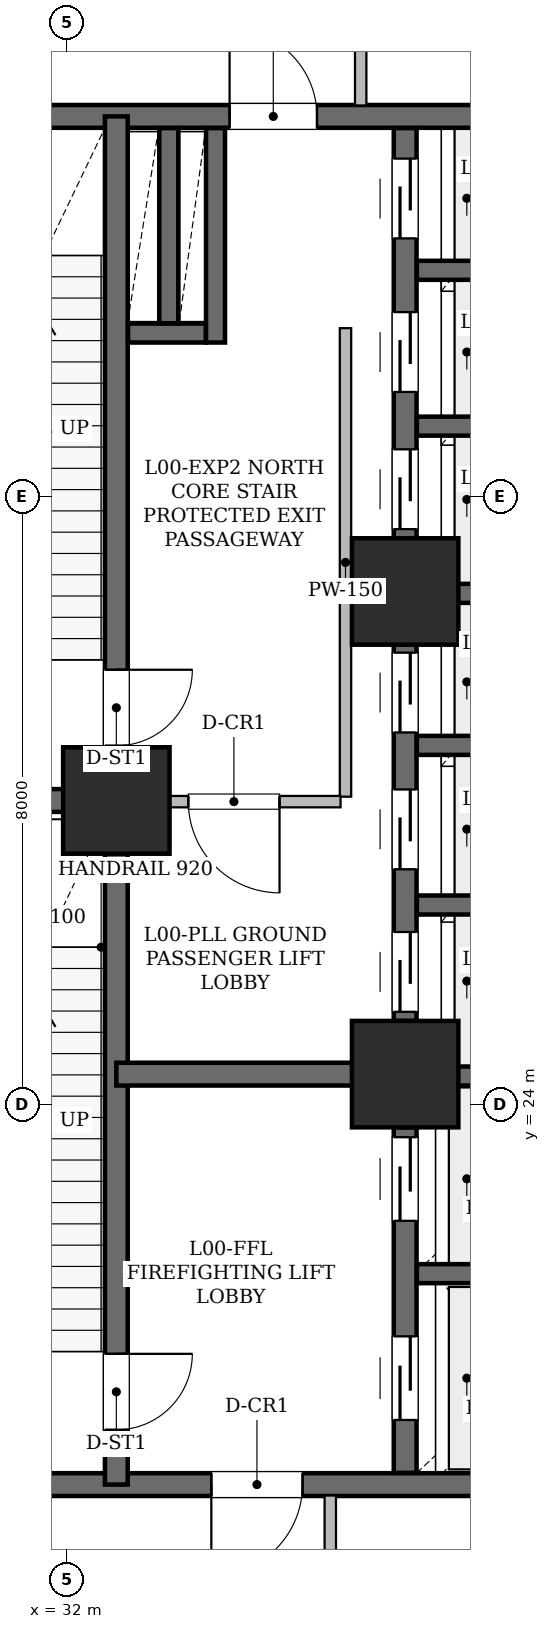
"""IFC4 building model, lengths in metres.
Left out: names, types, materials, properties, quantities, classifications, styles, units other than length and angle.
Written with IfcOpenShell. Run it as: python <this file> out.ifc"""

import sys

from ifc_helpers import new_model, si_unit, direction, frame, frame_2d, origin, origin_2d, place, context, subcontext, project, spatial, rectangle, hollow_rectangle, extrude, element, fill, save


model = new_model("IFC4")
c1 = context("Model", 3, precision=1e-05, world=origin(), true_north=direction((0.0, 1.0)))
c2 = subcontext(c1, "Body", "Model", "MODEL_VIEW")
j1 = project(units=[si_unit("LENGTHUNIT", "METRE"), si_unit("PLANEANGLEUNIT", "RADIAN")], contexts=[c1])
p1 = place(None, origin())
s1 = spatial("IfcSite", under=j1, at=p1, CompositionType="ELEMENT")
p2 = place(p1, origin())
s2 = spatial("IfcBuilding", under=s1, at=p2, CompositionType="ELEMENT")
p3 = place(p2, origin())
s3 = spatial("IfcBuildingStorey", under=s2, at=p3, CompositionType="ELEMENT", Elevation=0.0)
for number, where, z_axis, x_axis in (
    (1, (32.65, 28.0, 0.0), (0.0, 0.0, 1.0), (1.0, 0.0, 0.0)),
    (2, (36.45, 24.4, 0.0), (0.0, 0.0, 1.0), (1.0, 0.0, 0.0)),
    (3, (36.45, 30.75, 0.0), (0.0, 0.0, 1.0), (1.0, 0.0, 0.0)),
):
    element("IfcColumn", number, at=place(p3, frame(where, z_axis=z_axis, x_axis=x_axis)), inside=s3, PredefinedType="COLUMN", context=c2, shape_type="SweptSolid", body=[
        extrude(hollow_rectangle(XDim=1.4, YDim=1.4, WallThickness=0.07, at=origin_2d()), origin(), (0.0, 0.0, 1.0), 7.2),
    ])
p4 = place(p3, frame((39.4, 19.0, 0.0), z_axis=(0.0, 0.0, 1.0), x_axis=(-1.0, 0.0, 0.0)))
e4 = element("IfcWall", 4, at=p4, inside=s3, PredefinedType="SHEAR", context=c2, shape_type="SweptSolid", body=[
    extrude(rectangle(XDim=10.4, YDim=0.3, at=frame_2d((5.2, 0.0))), origin(), (0.0, 0.0, 1.0), 6.78),
])
p5 = place(p4, frame((4.3, 0.0, 0.0)))
e5 = element("IfcOpeningElement", 5, at=p5, cuts=e4, PredefinedType="OPENING", context=c2, shape_type="SweptSolid", body=[
    extrude(rectangle(XDim=1.2, YDim=2.15, at=frame_2d((0.6, 1.075))), frame((0.0, 0.16, 0.0), z_axis=(0.0, -1.0, 0.0), x_axis=(1.0, 0.0, 0.0)), (0.0, 0.0, 1.0), 0.32),
])
p6 = place(p3, frame((29.0, 37.0, 0.0), z_axis=(0.0, 0.0, 1.0), x_axis=(1.0, 0.0, 0.0)))
e6 = element("IfcWall", 6, at=p6, inside=s3, PredefinedType="SHEAR", context=c2, shape_type="SweptSolid", body=[
    extrude(rectangle(XDim=10.4, YDim=0.3, at=frame_2d((5.2, 0.0))), origin(), (0.0, 0.0, 1.0), 6.78),
])
p7 = place(p6, frame((5.14, 0.0, 0.0)))
e7 = element("IfcOpeningElement", 7, at=p7, cuts=e6, PredefinedType="OPENING", context=c2, shape_type="SweptSolid", body=[
    extrude(rectangle(XDim=1.15, YDim=2.2, at=frame_2d((0.575, 1.1))), frame((0.0, 0.16, 0.0), z_axis=(0.0, -1.0, 0.0), x_axis=(1.0, 0.0, 0.0)), (0.0, 0.0, 1.0), 0.32),
])
p8 = place(p3, frame((32.65, 28.0, 0.0), z_axis=(0.0, 0.0, 1.0), x_axis=(0.0, -1.0, 0.0)))
e8 = element("IfcWall", 8, at=p8, inside=s3, PredefinedType="SHEAR", context=c2, shape_type="SweptSolid", body=[
    extrude(rectangle(XDim=9.0, YDim=0.3, at=frame_2d((4.5, 0.0))), origin(), (0.0, 0.0, 1.0), 6.78),
])
p9 = place(p8, frame((7.28, 0.0, 0.0)))
e9 = element("IfcOpeningElement", 9, at=p9, cuts=e8, PredefinedType="OPENING", context=c2, shape_type="SweptSolid", body=[
    extrude(rectangle(XDim=1.0, YDim=2.15, at=frame_2d((0.5, 1.075))), frame((0.0, 0.16, 0.0), z_axis=(0.0, -1.0, 0.0), x_axis=(1.0, 0.0, 0.0)), (0.0, 0.0, 1.0), 0.32),
])
p10 = place(p3, frame((32.65, 37.0, 0.0), z_axis=(0.0, 0.0, 1.0), x_axis=(0.0, -1.0, 0.0)))
e10 = element("IfcWall", 10, at=p10, inside=s3, PredefinedType="SHEAR", context=c2, shape_type="SweptSolid", body=[
    extrude(rectangle(XDim=9.0, YDim=0.3, at=frame_2d((4.5, 0.0))), origin(), (0.0, 0.0, 1.0), 6.78),
])
p11 = place(p10, frame((7.28, 0.0, 0.0)))
e11 = element("IfcOpeningElement", 11, at=p11, cuts=e10, PredefinedType="OPENING", context=c2, shape_type="SweptSolid", body=[
    extrude(rectangle(XDim=1.0, YDim=2.15, at=frame_2d((0.5, 1.075))), frame((0.0, 0.16, 0.0), z_axis=(0.0, -1.0, 0.0), x_axis=(1.0, 0.0, 0.0)), (0.0, 0.0, 1.0), 0.32),
])
p12 = place(p3, frame((29.0, 28.0, 0.0), z_axis=(0.0, 0.0, 1.0), x_axis=(1.0, 0.0, 0.0)))
e12 = element("IfcWall", 12, at=p12, inside=s3, PredefinedType="SHEAR", context=c2, shape_type="SweptSolid", body=[
    extrude(rectangle(XDim=3.65, YDim=0.3, at=frame_2d((1.825, 0.0))), origin(), (0.0, 0.0, 1.0), 6.78),
])
p13 = place(p3, frame((32.65, 24.4, 0.0), z_axis=(0.0, 0.0, 1.0), x_axis=(1.0, 0.0, 0.0)))
e13 = element("IfcWall", 13, at=p13, inside=s3, PredefinedType="SHEAR", context=c2, shape_type="SweptSolid", body=[
    extrude(rectangle(XDim=3.8, YDim=0.3, at=frame_2d((1.9, 0.0))), origin(), (0.0, 0.0, 1.0), 6.78),
])
p14 = place(p3, frame((36.45, 19.154, 0.0), z_axis=(0.0, 0.0, 1.0), x_axis=(0.0, 1.0, 0.0)))
e14 = element("IfcWall", 14, at=p14, inside=s3, PredefinedType="SHEAR", context=c2, shape_type="SweptSolid", body=[
    extrude(rectangle(XDim=4.546, YDim=0.3, at=frame_2d((2.273, 0.0))), origin(), (0.0, 0.0, 1.0), 6.78),
])
p15 = place(p14, frame((0.696, 0.0, 0.0)))
e15 = element("IfcOpeningElement", 15, at=p15, cuts=e14, PredefinedType="OPENING", context=c2, shape_type="SweptSolid", body=[
    extrude(rectangle(XDim=1.1, YDim=2.15, at=frame_2d((0.55, 1.075))), frame((0.0, 0.16, 0.0), z_axis=(0.0, -1.0, 0.0), x_axis=(1.0, 0.0, 0.0)), (0.0, 0.0, 1.0), 0.32),
])
p16 = place(p14, frame((3.316, 0.0, 0.0)))
e16 = element("IfcOpeningElement", 16, at=p16, cuts=e14, PredefinedType="OPENING", context=c2, shape_type="SweptSolid", body=[
    extrude(rectangle(XDim=1.1, YDim=2.15, at=frame_2d((0.55, 1.075))), frame((0.0, 0.16, 0.0), z_axis=(0.0, -1.0, 0.0), x_axis=(1.0, 0.0, 0.0)), (0.0, 0.0, 1.0), 0.32),
])
p17 = place(p3, frame((36.45, 25.1, 0.0), z_axis=(0.0, 0.0, 1.0), x_axis=(0.0, 1.0, 0.0)))
e17 = element("IfcWall", 17, at=p17, inside=s3, PredefinedType="SHEAR", context=c2, shape_type="SweptSolid", body=[
    extrude(rectangle(XDim=4.95, YDim=0.3, at=frame_2d((2.475, 0.0))), origin(), (0.0, 0.0, 1.0), 6.78),
])
p18 = place(p17, frame((0.12, 0.0, 0.0)))
e18 = element("IfcOpeningElement", 18, at=p18, cuts=e17, PredefinedType="OPENING", context=c2, shape_type="SweptSolid", body=[
    extrude(rectangle(XDim=1.05, YDim=2.15, at=frame_2d((0.525, 1.075))), frame((0.0, 0.16, 0.0), z_axis=(0.0, -1.0, 0.0), x_axis=(1.0, 0.0, 0.0)), (0.0, 0.0, 1.0), 0.32),
])
p19 = place(p17, frame((1.995, 0.0, 0.0)))
e19 = element("IfcOpeningElement", 19, at=p19, cuts=e17, PredefinedType="OPENING", context=c2, shape_type="SweptSolid", body=[
    extrude(rectangle(XDim=1.05, YDim=2.15, at=frame_2d((0.525, 1.075))), frame((0.0, 0.16, 0.0), z_axis=(0.0, -1.0, 0.0), x_axis=(1.0, 0.0, 0.0)), (0.0, 0.0, 1.0), 0.32),
])
p20 = place(p17, frame((3.795, 0.0, 0.0)))
e20 = element("IfcOpeningElement", 20, at=p20, cuts=e17, PredefinedType="OPENING", context=c2, shape_type="SweptSolid", body=[
    extrude(rectangle(XDim=1.05, YDim=2.15, at=frame_2d((0.525, 1.075))), frame((0.0, 0.16, 0.0), z_axis=(0.0, -1.0, 0.0), x_axis=(1.0, 0.0, 0.0)), (0.0, 0.0, 1.0), 0.32),
])
p21 = place(p3, frame((36.45, 31.45, 0.0), z_axis=(0.0, 0.0, 1.0), x_axis=(0.0, 1.0, 0.0)))
e21 = element("IfcWall", 21, at=p21, inside=s3, PredefinedType="SHEAR", context=c2, shape_type="SweptSolid", body=[
    extrude(rectangle(XDim=5.396, YDim=0.3, at=frame_2d((2.698, 0.0))), origin(), (0.0, 0.0, 1.0), 6.78),
])
p22 = place(p21, frame((0.12, 0.0, 0.0)))
e22 = element("IfcOpeningElement", 22, at=p22, cuts=e21, PredefinedType="OPENING", context=c2, shape_type="SweptSolid", body=[
    extrude(rectangle(XDim=1.05, YDim=2.15, at=frame_2d((0.525, 1.075))), frame((0.0, 0.16, 0.0), z_axis=(0.0, -1.0, 0.0), x_axis=(1.0, 0.0, 0.0)), (0.0, 0.0, 1.0), 0.32),
])
p23 = place(p21, frame((1.925, 0.0, 0.0)))
e23 = element("IfcOpeningElement", 23, at=p23, cuts=e21, PredefinedType="OPENING", context=c2, shape_type="SweptSolid", body=[
    extrude(rectangle(XDim=1.05, YDim=2.15, at=frame_2d((0.525, 1.075))), frame((0.0, 0.16, 0.0), z_axis=(0.0, -1.0, 0.0), x_axis=(1.0, 0.0, 0.0)), (0.0, 0.0, 1.0), 0.32),
])
p24 = place(p21, frame((3.945, 0.0, 0.0)))
e24 = element("IfcOpeningElement", 24, at=p24, cuts=e21, PredefinedType="OPENING", context=c2, shape_type="SweptSolid", body=[
    extrude(rectangle(XDim=1.05, YDim=2.15, at=frame_2d((0.525, 1.075))), frame((0.0, 0.16, 0.0), z_axis=(0.0, -1.0, 0.0), x_axis=(1.0, 0.0, 0.0)), (0.0, 0.0, 1.0), 0.32),
])
for number, where, z_axis, x_axis in (
    (25, (36.604, 21.775, 0.0), (0.0, 0.0, 1.0), (1.0, 0.0, 0.0)),
    (26, (36.604, 24.375, 0.0), (0.0, 0.0, 1.0), (1.0, 0.0, 0.0)),
    (27, (36.604, 26.625, 0.0), (0.0, 0.0, 1.0), (1.0, 0.0, 0.0)),
    (28, (36.604, 28.725, 0.0), (0.0, 0.0, 1.0), (1.0, 0.0, 0.0)),
    (29, (36.604, 30.725, 0.0), (0.0, 0.0, 1.0), (1.0, 0.0, 0.0)),
    (30, (36.604, 32.925, 0.0), (0.0, 0.0, 1.0), (1.0, 0.0, 0.0)),
    (31, (36.604, 34.975, 0.0), (0.0, 0.0, 1.0), (1.0, 0.0, 0.0)),
):
    element("IfcWall", number, at=place(p3, frame(where, z_axis=z_axis, x_axis=x_axis)), inside=s3, PredefinedType="SHEAR", context=c2, shape_type="SweptSolid", body=[
        extrude(rectangle(XDim=2.642, YDim=0.25, at=frame_2d((1.321, 0.0))), origin(), (0.0, 0.0, 1.0), 6.78),
    ])
p25 = place(p3, frame((33.955, 34.025, 0.0), z_axis=(0.0, 0.0, 1.0), x_axis=(0.0, 1.0, 0.0)))
e32 = element("IfcWall", 32, at=p25, inside=s3, PredefinedType="SHEAR", context=c2, shape_type="SweptSolid", body=[
    extrude(rectangle(XDim=2.821, YDim=0.25, at=frame_2d((1.411, 0.0))), origin(), (0.0, 0.0, 1.0), 6.78),
])
p26 = place(p3, frame((32.804, 34.15, 0.0), z_axis=(0.0, 0.0, 1.0), x_axis=(1.0, 0.0, 0.0)))
e33 = element("IfcWall", 33, at=p26, inside=s3, PredefinedType="SHEAR", context=c2, shape_type="SweptSolid", body=[
    extrude(rectangle(XDim=1.022, YDim=0.25, at=frame_2d((0.511, 0.0))), origin(), (0.0, 0.0, 1.0), 6.78),
])
p27 = place(p3, frame((33.34, 34.279, 0.0), z_axis=(0.0, 0.0, 1.0), x_axis=(0.0, 1.0, 0.0)))
e34 = element("IfcWall", 34, at=p27, inside=s3, PredefinedType="SHEAR", context=c2, shape_type="SweptSolid", body=[
    extrude(rectangle(XDim=2.567, YDim=0.25, at=frame_2d((1.283, 0.0))), origin(), (0.0, 0.0, 1.0), 6.78),
])
p28 = place(p3, frame((35.665, 34.214, 0.0), z_axis=(0.0, 0.0, 1.0), x_axis=(0.0, -1.0, 0.0)))
e35 = element("IfcWall", 35, at=p28, inside=s3, PredefinedType="STANDARD", context=c2, shape_type="SweptSolid", body=[
    extrude(rectangle(XDim=6.164, YDim=0.15, at=frame_2d((3.082, 0.0))), origin(), (0.0, 0.0, 1.0), 6.78),
])
p29 = place(p3, frame((35.6, 27.985, 0.0), z_axis=(0.0, 0.0, 1.0), x_axis=(-1.0, 0.0, 0.0)))
e36 = element("IfcWall", 36, at=p29, inside=s3, PredefinedType="STANDARD", context=c2, shape_type="SweptSolid", body=[
    extrude(rectangle(XDim=2.806, YDim=0.15, at=frame_2d((1.403, 0.0))), origin(), (0.0, 0.0, 1.0), 6.237),
])
p30 = place(p29, frame((0.803, 0.0, 0.0)))
e37 = element("IfcOpeningElement", 37, at=p30, cuts=e36, PredefinedType="OPENING", context=c2, shape_type="SweptSolid", body=[
    extrude(rectangle(XDim=1.2, YDim=2.15, at=frame_2d((0.6, 1.075))), frame((0.0, 0.085, 0.0), z_axis=(0.0, -1.0, 0.0), x_axis=(1.0, 0.0, 0.0)), (0.0, 0.0, 1.0), 0.17),
])
p31 = place(p3, frame((35.465, 18.856, 0.0), z_axis=(0.0, 0.0, 1.0), x_axis=(0.0, -1.0, 0.0)))
e38 = element("IfcWall", 38, at=p31, inside=s3, PredefinedType="STANDARD", context=c2, shape_type="SweptSolid", body=[
    extrude(rectangle(XDim=6.644, YDim=0.15, at=frame_2d((3.322, 0.0))), origin(), (0.0, 0.0, 1.0), 5.915),
])
p32 = place(p31, frame((2.722, 0.0, 0.0)))
e39 = element("IfcOpeningElement", 39, at=p32, cuts=e38, PredefinedType="OPENING", context=c2, shape_type="SweptSolid", body=[
    extrude(rectangle(XDim=1.2, YDim=2.15, at=frame_2d((0.6, 1.075))), frame((0.0, 0.085, 0.0), z_axis=(0.0, -1.0, 0.0), x_axis=(1.0, 0.0, 0.0)), (0.0, 0.0, 1.0), 0.17),
])
p33 = place(p3, frame((35.865, 43.788, 0.0), z_axis=(0.0, 0.0, 1.0), x_axis=(0.0, -1.0, 0.0)))
e40 = element("IfcWall", 40, at=p33, inside=s3, PredefinedType="STANDARD", context=c2, shape_type="SweptSolid", body=[
    extrude(rectangle(XDim=6.644, YDim=0.15, at=frame_2d((3.322, 0.0))), origin(), (0.0, 0.0, 1.0), 5.915),
])
p34 = place(p33, frame((2.722, 0.0, 0.0)))
e41 = element("IfcOpeningElement", 41, at=p34, cuts=e40, PredefinedType="OPENING", context=c2, shape_type="SweptSolid", body=[
    extrude(rectangle(XDim=1.2, YDim=2.15, at=frame_2d((0.6, 1.075))), frame((0.0, 0.085, 0.0), z_axis=(0.0, -1.0, 0.0), x_axis=(1.0, 0.0, 0.0)), (0.0, 0.0, 1.0), 0.17),
])
p35 = place(p9, origin())
e42 = element("IfcDoor", 42, at=p35, inside=s3, OperationType="SINGLE_SWING_LEFT", PredefinedType="DOOR", context=c2, shape_type="SweptSolid", body=[
    extrude(rectangle(XDim=1.0, YDim=2.15, at=frame_2d((0.5, 1.075))), frame((0.0, 0.025, 0.0), z_axis=(0.0, -1.0, 0.0), x_axis=(1.0, 0.0, 0.0)), (0.0, 0.0, 1.0), 0.05),
])
fill(e9, e42)
p36 = place(p11, origin())
e43 = element("IfcDoor", 43, at=p36, inside=s3, OperationType="SINGLE_SWING_LEFT", PredefinedType="DOOR", context=c2, shape_type="SweptSolid", body=[
    extrude(rectangle(XDim=1.0, YDim=2.15, at=frame_2d((0.5, 1.075))), frame((0.0, 0.025, 0.0), z_axis=(0.0, -1.0, 0.0), x_axis=(1.0, 0.0, 0.0)), (0.0, 0.0, 1.0), 0.05),
])
fill(e11, e43)
p37 = place(p5, origin())
e44 = element("IfcDoor", 44, at=p37, inside=s3, OperationType="SINGLE_SWING_RIGHT", PredefinedType="DOOR", context=c2, shape_type="SweptSolid", body=[
    extrude(rectangle(XDim=1.2, YDim=2.15, at=frame_2d((0.6, 1.075))), frame((0.0, 0.025, 0.0), z_axis=(0.0, -1.0, 0.0), x_axis=(1.0, 0.0, 0.0)), (0.0, 0.0, 1.0), 0.05),
])
fill(e5, e44)
p38 = place(p7, origin())
e45 = element("IfcDoor", 45, at=p38, inside=s3, OperationType="SINGLE_SWING_LEFT", PredefinedType="DOOR", context=c2, shape_type="SweptSolid", body=[
    extrude(rectangle(XDim=1.15, YDim=2.2, at=frame_2d((0.575, 1.1))), frame((0.0, 0.025, 0.0), z_axis=(0.0, -1.0, 0.0), x_axis=(1.0, 0.0, 0.0)), (0.0, 0.0, 1.0), 0.05),
])
fill(e7, e45)
p39 = place(p15, origin())
e46 = element("IfcDoor", 46, at=p39, inside=s3, OperationType="SLIDING_TO_LEFT", PredefinedType="DOOR", context=c2, shape_type="SweptSolid", body=[
    extrude(rectangle(XDim=1.1, YDim=2.15, at=frame_2d((0.55, 1.075))), frame((0.0, 0.025, 0.0), z_axis=(0.0, -1.0, 0.0), x_axis=(1.0, 0.0, 0.0)), (0.0, 0.0, 1.0), 0.05),
])
fill(e15, e46)
p40 = place(p16, origin())
e47 = element("IfcDoor", 47, at=p40, inside=s3, OperationType="SLIDING_TO_LEFT", PredefinedType="DOOR", context=c2, shape_type="SweptSolid", body=[
    extrude(rectangle(XDim=1.1, YDim=2.15, at=frame_2d((0.55, 1.075))), frame((0.0, 0.025, 0.0), z_axis=(0.0, -1.0, 0.0), x_axis=(1.0, 0.0, 0.0)), (0.0, 0.0, 1.0), 0.05),
])
fill(e16, e47)
p41 = place(p18, origin())
e48 = element("IfcDoor", 48, at=p41, inside=s3, OperationType="SLIDING_TO_LEFT", PredefinedType="DOOR", context=c2, shape_type="SweptSolid", body=[
    extrude(rectangle(XDim=1.05, YDim=2.15, at=frame_2d((0.525, 1.075))), frame((0.0, 0.025, 0.0), z_axis=(0.0, -1.0, 0.0), x_axis=(1.0, 0.0, 0.0)), (0.0, 0.0, 1.0), 0.05),
])
fill(e18, e48)
p42 = place(p19, origin())
e49 = element("IfcDoor", 49, at=p42, inside=s3, OperationType="SLIDING_TO_LEFT", PredefinedType="DOOR", context=c2, shape_type="SweptSolid", body=[
    extrude(rectangle(XDim=1.05, YDim=2.15, at=frame_2d((0.525, 1.075))), frame((0.0, 0.025, 0.0), z_axis=(0.0, -1.0, 0.0), x_axis=(1.0, 0.0, 0.0)), (0.0, 0.0, 1.0), 0.05),
])
fill(e19, e49)
p43 = place(p20, origin())
e50 = element("IfcDoor", 50, at=p43, inside=s3, OperationType="SLIDING_TO_LEFT", PredefinedType="DOOR", context=c2, shape_type="SweptSolid", body=[
    extrude(rectangle(XDim=1.05, YDim=2.15, at=frame_2d((0.525, 1.075))), frame((0.0, 0.025, 0.0), z_axis=(0.0, -1.0, 0.0), x_axis=(1.0, 0.0, 0.0)), (0.0, 0.0, 1.0), 0.05),
])
fill(e20, e50)
p44 = place(p22, origin())
e51 = element("IfcDoor", 51, at=p44, inside=s3, OperationType="SLIDING_TO_LEFT", PredefinedType="DOOR", context=c2, shape_type="SweptSolid", body=[
    extrude(rectangle(XDim=1.05, YDim=2.15, at=frame_2d((0.525, 1.075))), frame((0.0, 0.025, 0.0), z_axis=(0.0, -1.0, 0.0), x_axis=(1.0, 0.0, 0.0)), (0.0, 0.0, 1.0), 0.05),
])
fill(e22, e51)
p45 = place(p23, origin())
e52 = element("IfcDoor", 52, at=p45, inside=s3, OperationType="SLIDING_TO_LEFT", PredefinedType="DOOR", context=c2, shape_type="SweptSolid", body=[
    extrude(rectangle(XDim=1.05, YDim=2.15, at=frame_2d((0.525, 1.075))), frame((0.0, 0.025, 0.0), z_axis=(0.0, -1.0, 0.0), x_axis=(1.0, 0.0, 0.0)), (0.0, 0.0, 1.0), 0.05),
])
fill(e23, e52)
p46 = place(p24, origin())
e53 = element("IfcDoor", 53, at=p46, inside=s3, OperationType="SLIDING_TO_LEFT", PredefinedType="DOOR", context=c2, shape_type="SweptSolid", body=[
    extrude(rectangle(XDim=1.05, YDim=2.15, at=frame_2d((0.525, 1.075))), frame((0.0, 0.025, 0.0), z_axis=(0.0, -1.0, 0.0), x_axis=(1.0, 0.0, 0.0)), (0.0, 0.0, 1.0), 0.05),
])
fill(e24, e53)
p47 = place(p30, origin())
e54 = element("IfcDoor", 54, at=p47, inside=s3, OperationType="SINGLE_SWING_LEFT", PredefinedType="DOOR", context=c2, shape_type="SweptSolid", body=[
    extrude(rectangle(XDim=1.2, YDim=2.15, at=frame_2d((0.6, 1.075))), frame((0.0, 0.025, 0.0), z_axis=(0.0, -1.0, 0.0), x_axis=(1.0, 0.0, 0.0)), (0.0, 0.0, 1.0), 0.05),
])
fill(e37, e54)
save(model, sys.argv[1])
